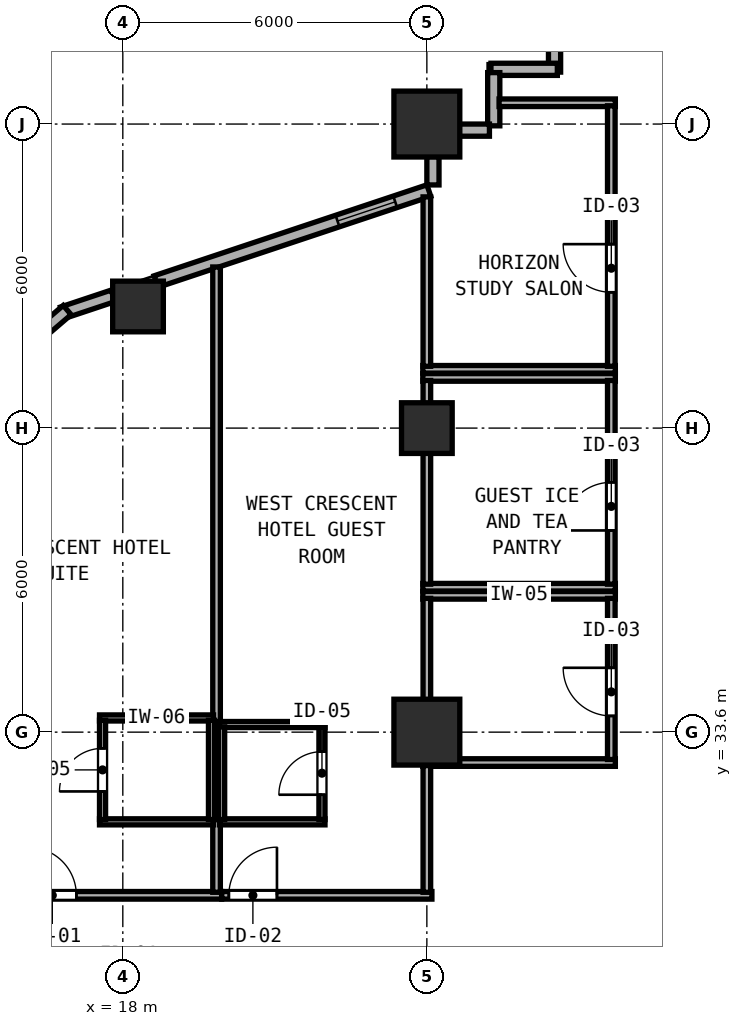
"""IFC4 building model, lengths in metres.
Left out: names, types, materials, properties, quantities, classifications, styles, units other than length and angle.
Written with IfcOpenShell. Run it as: python <this file> out.ifc"""

import sys

from ifc_helpers import new_model, si_unit, direction, frame, frame_2d, origin, origin_2d, place, context, subcontext, project, spatial, rectangle, hollow_rectangle, extrude, element, fill, save


model = new_model("IFC4")
c1 = context("Model", 3, precision=1e-05, world=origin(), true_north=direction((0.0, 1.0)))
c2 = subcontext(c1, "Body", "Model", "MODEL_VIEW")
j1 = project(units=[si_unit("LENGTHUNIT", "METRE"), si_unit("PLANEANGLEUNIT", "RADIAN")], contexts=[c1])
p1 = place(None, origin())
s1 = spatial("IfcSite", under=j1, at=p1, CompositionType="ELEMENT")
p2 = place(p1, origin())
s2 = spatial("IfcBuilding", under=s1, at=p2, CompositionType="ELEMENT")
p3 = place(p2, frame((0.0, 0.0, 35.4)))
s3 = spatial("IfcBuildingStorey", under=s2, at=p3, CompositionType="ELEMENT", Elevation=35.4)
for number, where, z_axis, x_axis in (
    (1, (24.0, 33.6, 0.0), (0.0, 0.0, 1.0), (1.0, 0.0, 0.0)),
    (2, (24.0, 45.6, 0.0), (0.0, 0.0, 1.0), (1.0, 0.0, 0.0)),
):
    element("IfcColumn", number, at=place(p3, frame(where, z_axis=z_axis, x_axis=x_axis)), inside=s3, PredefinedType="COLUMN", context=c2, shape_type="SweptSolid", body=[
        extrude(hollow_rectangle(XDim=1.3, YDim=1.3, WallThickness=0.048, at=origin_2d()), origin(), (0.0, 0.0, 1.0), 3.8),
    ])
for number, where, z_axis, x_axis in (
    (3, (24.0, 39.6, 0.0), (0.0, 0.0, 1.0), (1.0, 0.0, 0.0)),
    (4, (18.3, 42.0, 0.0), (0.0, 0.0, 1.0), (1.0, 0.0, 0.0)),
):
    element("IfcColumn", number, at=place(p3, frame(where, z_axis=z_axis, x_axis=x_axis)), inside=s3, PredefinedType="COLUMN", context=c2, shape_type="SweptSolid", body=[
        extrude(hollow_rectangle(XDim=1.0, YDim=1.0, WallThickness=0.038, at=origin_2d()), origin(), (0.0, 0.0, 1.0), 3.8),
    ])
p4 = place(p3, frame((26.52, 47.995, 0.0), z_axis=(0.0, 0.0, 1.0), x_axis=(0.0, -1.0, 0.0)))
e5 = element("IfcWall", 5, at=p4, inside=s3, PredefinedType="SOLIDWALL", context=c2, shape_type="SweptSolid", body=[
    extrude(rectangle(XDim=1.37, YDim=0.24, at=frame_2d((0.685, 0.0))), origin(), (0.0, 0.0, 1.0), 3.6),
])
p5 = place(p3, frame((26.575, 46.68, 0.0), z_axis=(0.0, 0.0, 1.0), x_axis=(-1.0, 0.0, 0.0)))
e6 = element("IfcWall", 6, at=p5, inside=s3, PredefinedType="SOLIDWALL", context=c2, shape_type="SweptSolid", body=[
    extrude(rectangle(XDim=1.31, YDim=0.24, at=frame_2d((0.655, 0.0))), origin(), (0.0, 0.0, 1.0), 3.6),
])
p6 = place(p3, frame((25.32, 46.615, 0.0), z_axis=(0.0, 0.0, 1.0), x_axis=(0.0, -1.0, 0.0)))
e7 = element("IfcWall", 7, at=p6, inside=s3, PredefinedType="SOLIDWALL", context=c2, shape_type="SweptSolid", body=[
    extrude(rectangle(XDim=1.05, YDim=0.24, at=frame_2d((0.525, 0.0))), origin(), (0.0, 0.0, 1.0), 3.6),
])
p7 = place(p3, frame((25.235, 45.48, 0.0), z_axis=(0.0, 0.0, 1.0), x_axis=(-1.0, 0.0, 0.0)))
e8 = element("IfcWall", 8, at=p7, inside=s3, PredefinedType="SOLIDWALL", context=c2, shape_type="SweptSolid", body=[
    extrude(rectangle(XDim=0.593, YDim=0.24, at=frame_2d((0.296, 0.0))), origin(), (0.0, 0.0, 1.0), 3.6),
])
p8 = place(p3, frame((24.12, 44.958, 0.0), z_axis=(0.0, 0.0, 1.0), x_axis=(0.0, -1.0, 0.0)))
e9 = element("IfcWall", 9, at=p8, inside=s3, PredefinedType="SOLIDWALL", context=c2, shape_type="SweptSolid", body=[
    extrude(rectangle(XDim=0.56, YDim=0.24, at=frame_2d((0.28, 0.0))), origin(), (0.0, 0.0, 1.0), 3.097),
])
p9 = place(p3, frame((24.039, 44.287, 0.0), z_axis=(0.0, 0.0, 1.0), x_axis=(-0.948678995954, -0.316240672014, 0.0)))
e10 = element("IfcWall", 10, at=p9, inside=s3, PredefinedType="SOLIDWALL", context=c2, shape_type="SweptSolid", body=[
    extrude(rectangle(XDim=5.675, YDim=0.24, at=frame_2d((2.837, 0.0))), origin(), (0.0, 0.0, 1.0), 3.097),
])
p10 = place(p9, frame((0.7, 0.0, 0.85)))
e11 = element("IfcOpeningElement", 11, at=p10, cuts=e10, PredefinedType="OPENING", context=c2, shape_type="SweptSolid", body=[
    extrude(rectangle(XDim=1.2, YDim=1.85, at=frame_2d((0.6, 0.925))), frame((0.0, 0.13, 0.0), z_axis=(0.0, -1.0, 0.0), x_axis=(1.0, 0.0, 0.0)), (0.0, 0.0, 1.0), 0.26),
])
p11 = place(p3, frame((17.808, 42.209, 0.0), z_axis=(0.0, 0.0, 1.0), x_axis=(-0.948706457285, -0.316158279832, 0.0)))
e12 = element("IfcWall", 12, at=p11, inside=s3, PredefinedType="SOLIDWALL", context=c2, shape_type="SweptSolid", body=[
    extrude(rectangle(XDim=1.054, YDim=0.24, at=frame_2d((0.527, 0.0))), origin(), (0.0, 0.0, 1.0), 3.6),
])
p12 = place(p3, frame((16.902, 41.929, 0.0), z_axis=(0.0, 0.0, 1.0), x_axis=(-0.759275136126, -0.650769750112, 0.0)))
e13 = element("IfcWall", 13, at=p12, inside=s3, PredefinedType="SOLIDWALL", context=c2, shape_type="SweptSolid", body=[
    extrude(rectangle(XDim=3.719, YDim=0.24, at=frame_2d((1.86, 0.0))), origin(), (0.0, 0.0, 1.0), 3.6),
])
p13 = place(p12, frame((0.7, 0.0, 0.85)))
e14 = element("IfcOpeningElement", 14, at=p13, cuts=e13, PredefinedType="OPENING", context=c2, shape_type="SweptSolid", body=[
    extrude(rectangle(XDim=1.2, YDim=1.85, at=frame_2d((0.6, 0.925))), frame((0.0, 0.13, 0.0), z_axis=(0.0, -1.0, 0.0), x_axis=(1.0, 0.0, 0.0)), (0.0, 0.0, 1.0), 0.26),
])
for number, where, z_axis, x_axis in (
    (15, (23.92, 36.3, 0.0), (0.0, 0.0, 1.0), (1.0, 0.0, 0.0)),
    (16, (23.92, 33.0, 0.0), (0.0, 0.0, 1.0), (1.0, 0.0, 0.0)),
):
    element("IfcWall", number, at=place(p3, frame(where, z_axis=z_axis, x_axis=x_axis)), inside=s3, PredefinedType="PARTITIONING", context=c2, shape_type="SweptSolid", body=[
        extrude(rectangle(XDim=3.8, YDim=0.15, at=frame_2d((1.9, 0.0))), origin(), (0.0, 0.0, 1.0), 3.6),
    ])
p14 = place(p3, frame((24.0, 33.06, 0.0), z_axis=(0.0, 0.0, 1.0), x_axis=(0.0, 1.0, 0.0)))
e17 = element("IfcWall", 17, at=p14, inside=s3, PredefinedType="PARTITIONING", context=c2, shape_type="SweptSolid", body=[
    extrude(rectangle(XDim=3.18, YDim=0.15, at=frame_2d((1.59, 0.0))), origin(), (0.0, 0.0, 1.0), 3.097),
])
p15 = place(p3, frame((27.64, 33.06, 0.0), z_axis=(0.0, 0.0, 1.0), x_axis=(0.0, 1.0, 0.0)))
e18 = element("IfcWall", 18, at=p15, inside=s3, PredefinedType="PARTITIONING", context=c2, shape_type="SweptSolid", body=[
    extrude(rectangle(XDim=3.18, YDim=0.15, at=frame_2d((1.59, 0.0))), origin(), (0.0, 0.0, 1.0), 3.6),
])
p16 = place(p15, frame((1.81, 0.0, 0.0), z_axis=(0.0, 0.0, 1.0), x_axis=(-1.0, 0.0, 0.0)))
e19 = element("IfcOpeningElement", 19, at=p16, cuts=e18, PredefinedType="OPENING", context=c2, shape_type="SweptSolid", body=[
    extrude(rectangle(XDim=0.95, YDim=2.12, at=frame_2d((0.475, 1.06))), frame((0.0, 0.085, 0.0), z_axis=(0.0, -1.0, 0.0), x_axis=(1.0, 0.0, 0.0)), (0.0, 0.0, 1.0), 0.17),
])
for number, where, z_axis, x_axis in (
    (20, (23.92, 40.6, 0.0), (0.0, 0.0, 1.0), (1.0, 0.0, 0.0)),
    (21, (23.92, 36.46, 0.0), (0.0, 0.0, 1.0), (1.0, 0.0, 0.0)),
):
    element("IfcWall", number, at=place(p3, frame(where, z_axis=z_axis, x_axis=x_axis)), inside=s3, PredefinedType="PARTITIONING", context=c2, shape_type="SweptSolid", body=[
        extrude(rectangle(XDim=3.8, YDim=0.15, at=frame_2d((1.9, 0.0))), origin(), (0.0, 0.0, 1.0), 3.6),
    ])
p17 = place(p3, frame((24.0, 36.52, 0.0), z_axis=(0.0, 0.0, 1.0), x_axis=(0.0, 1.0, 0.0)))
e22 = element("IfcWall", 22, at=p17, inside=s3, PredefinedType="PARTITIONING", context=c2, shape_type="SweptSolid", body=[
    extrude(rectangle(XDim=4.02, YDim=0.15, at=frame_2d((2.01, 0.0))), origin(), (0.0, 0.0, 1.0), 3.097),
])
p18 = place(p3, frame((27.64, 36.52, 0.0), z_axis=(0.0, 0.0, 1.0), x_axis=(0.0, 1.0, 0.0)))
e23 = element("IfcWall", 23, at=p18, inside=s3, PredefinedType="PARTITIONING", context=c2, shape_type="SweptSolid", body=[
    extrude(rectangle(XDim=4.02, YDim=0.15, at=frame_2d((2.01, 0.0))), origin(), (0.0, 0.0, 1.0), 3.6),
])
p19 = place(p18, frame((2.01, 0.0, 0.0), z_axis=(0.0, 0.0, 1.0), x_axis=(-1.0, 0.0, 0.0)))
e24 = element("IfcOpeningElement", 24, at=p19, cuts=e23, PredefinedType="OPENING", context=c2, shape_type="SweptSolid", body=[
    extrude(rectangle(XDim=0.95, YDim=2.12, at=frame_2d((0.475, 1.06))), frame((0.0, 0.085, 0.0), z_axis=(0.0, -1.0, 0.0), x_axis=(1.0, 0.0, 0.0)), (0.0, 0.0, 1.0), 0.17),
])
p20 = place(p3, frame((25.425, 46.02, 0.0), z_axis=(0.0, 0.0, 1.0), x_axis=(1.0, 0.0, 0.0)))
e25 = element("IfcWall", 25, at=p20, inside=s3, PredefinedType="PARTITIONING", context=c2, shape_type="SweptSolid", body=[
    extrude(rectangle(XDim=2.295, YDim=0.15, at=frame_2d((1.147, 0.0))), origin(), (0.0, 0.0, 1.0), 3.6),
])
p21 = place(p3, frame((23.92, 40.76, 0.0), z_axis=(0.0, 0.0, 1.0), x_axis=(1.0, 0.0, 0.0)))
e26 = element("IfcWall", 26, at=p21, inside=s3, PredefinedType="PARTITIONING", context=c2, shape_type="SweptSolid", body=[
    extrude(rectangle(XDim=3.8, YDim=0.15, at=frame_2d((1.9, 0.0))), origin(), (0.0, 0.0, 1.0), 3.6),
])
p22 = place(p3, frame((24.0, 40.82, 0.0), z_axis=(0.0, 0.0, 1.0), x_axis=(0.0, 1.0, 0.0)))
e27 = element("IfcWall", 27, at=p22, inside=s3, PredefinedType="PARTITIONING", context=c2, shape_type="SweptSolid", body=[
    extrude(rectangle(XDim=3.343, YDim=0.15, at=frame_2d((1.671, 0.0))), origin(), (0.0, 0.0, 1.0), 3.097),
])
p23 = place(p3, frame((27.64, 40.82, 0.0), z_axis=(0.0, 0.0, 1.0), x_axis=(0.0, 1.0, 0.0)))
e28 = element("IfcWall", 28, at=p23, inside=s3, PredefinedType="PARTITIONING", context=c2, shape_type="SweptSolid", body=[
    extrude(rectangle(XDim=5.14, YDim=0.15, at=frame_2d((2.57, 0.0))), origin(), (0.0, 0.0, 1.0), 3.6),
])
p24 = place(p23, frame((2.41, 0.0, 0.0), z_axis=(0.0, 0.0, 1.0), x_axis=(-1.0, 0.0, 0.0)))
e29 = element("IfcOpeningElement", 29, at=p24, cuts=e28, PredefinedType="OPENING", context=c2, shape_type="SweptSolid", body=[
    extrude(rectangle(XDim=0.95, YDim=2.12, at=frame_2d((0.475, 1.06))), frame((0.0, 0.085, 0.0), z_axis=(0.0, -1.0, 0.0), x_axis=(1.0, 0.0, 0.0)), (0.0, 0.0, 1.0), 0.17),
])
p25 = place(p3, frame((11.7, 30.38, 0.0), z_axis=(0.0, 0.0, 1.0), x_axis=(1.0, 0.0, 0.0)))
e30 = element("IfcWall", 30, at=p25, inside=s3, PredefinedType="PARTITIONING", context=c2, shape_type="SweptSolid", body=[
    extrude(rectangle(XDim=8.25, YDim=0.15, at=frame_2d((4.125, 0.0))), origin(), (0.0, 0.0, 1.0), 3.6),
])
p26 = place(p25, frame((4.434, 0.0, 0.0)))
e31 = element("IfcOpeningElement", 31, at=p26, cuts=e30, PredefinedType="OPENING", context=c2, shape_type="SweptSolid", body=[
    extrude(rectangle(XDim=0.95, YDim=2.18, at=frame_2d((0.475, 1.09))), frame((0.0, 0.085, 0.0), z_axis=(0.0, -1.0, 0.0), x_axis=(1.0, 0.0, 0.0)), (0.0, 0.0, 1.0), 0.17),
])
p27 = place(p3, frame((19.85, 30.44, 0.0), z_axis=(0.0, 0.0, 1.0), x_axis=(0.0, 1.0, 0.0)))
e32 = element("IfcWall", 32, at=p27, inside=s3, PredefinedType="PARTITIONING", context=c2, shape_type="SweptSolid", body=[
    extrude(rectangle(XDim=12.34, YDim=0.15, at=frame_2d((6.17, 0.0))), origin(), (0.0, 0.0, 1.0), 3.6),
])
for number, where, z_axis, x_axis in (
    (33, (17.54, 33.88, 0.0), (0.0, 0.0, 1.0), (1.0, 0.0, 0.0)),
    (34, (17.54, 31.83, 0.0), (0.0, 0.0, 1.0), (1.0, 0.0, 0.0)),
):
    element("IfcWall", number, at=place(p3, frame(where, z_axis=z_axis, x_axis=x_axis)), inside=s3, PredefinedType="PARTITIONING", context=c2, shape_type="SweptSolid", body=[
        extrude(rectangle(XDim=2.25, YDim=0.12, at=frame_2d((1.125, 0.0))), origin(), (0.0, 0.0, 1.0), 3.6),
    ])
p28 = place(p3, frame((17.6, 31.875, 0.0), z_axis=(0.0, 0.0, 1.0), x_axis=(0.0, 1.0, 0.0)))
e35 = element("IfcWall", 35, at=p28, inside=s3, PredefinedType="PARTITIONING", context=c2, shape_type="SweptSolid", body=[
    extrude(rectangle(XDim=1.96, YDim=0.12, at=frame_2d((0.98, 0.0))), origin(), (0.0, 0.0, 1.0), 3.6),
])
p29 = place(p28, frame((1.405, 0.0, 0.0), z_axis=(0.0, 0.0, 1.0), x_axis=(-1.0, 0.0, 0.0)))
e36 = element("IfcOpeningElement", 36, at=p29, cuts=e35, PredefinedType="OPENING", context=c2, shape_type="SweptSolid", body=[
    extrude(rectangle(XDim=0.85, YDim=2.1, at=frame_2d((0.425, 1.05))), frame((0.0, 0.07, 0.0), z_axis=(0.0, -1.0, 0.0), x_axis=(1.0, 0.0, 0.0)), (0.0, 0.0, 1.0), 0.14),
])
p30 = place(p3, frame((19.75, 31.875, 0.0), z_axis=(0.0, 0.0, 1.0), x_axis=(0.0, 1.0, 0.0)))
e37 = element("IfcWall", 37, at=p30, inside=s3, PredefinedType="PARTITIONING", context=c2, shape_type="SweptSolid", body=[
    extrude(rectangle(XDim=1.96, YDim=0.12, at=frame_2d((0.98, 0.0))), origin(), (0.0, 0.0, 1.0), 3.6),
])
p31 = place(p3, frame((19.952, 30.38, 0.0), z_axis=(0.0, 0.0, 1.0), x_axis=(1.0, 0.0, 0.0)))
e38 = element("IfcWall", 38, at=p31, inside=s3, PredefinedType="PARTITIONING", context=c2, shape_type="SweptSolid", body=[
    extrude(rectangle(XDim=4.148, YDim=0.15, at=frame_2d((2.074, 0.0))), origin(), (0.0, 0.0, 1.0), 3.6),
])
p32 = place(p31, frame((0.14, 0.0, 0.0)))
e39 = element("IfcOpeningElement", 39, at=p32, cuts=e38, PredefinedType="OPENING", context=c2, shape_type="SweptSolid", body=[
    extrude(rectangle(XDim=0.95, YDim=2.15, at=frame_2d((0.475, 1.075))), frame((0.0, 0.085, 0.0), z_axis=(0.0, -1.0, 0.0), x_axis=(1.0, 0.0, 0.0)), (0.0, 0.0, 1.0), 0.17),
])
p33 = place(p3, frame((24.0, 30.44, 0.0), z_axis=(0.0, 0.0, 1.0), x_axis=(0.0, 1.0, 0.0)))
e40 = element("IfcWall", 40, at=p33, inside=s3, PredefinedType="PARTITIONING", context=c2, shape_type="SweptSolid", body=[
    extrude(rectangle(XDim=2.5, YDim=0.15, at=frame_2d((1.25, 0.0))), origin(), (0.0, 0.0, 1.0), 3.097),
])
for number, where, z_axis, x_axis in (
    (41, (19.91, 33.75, 0.0), (0.0, 0.0, 1.0), (1.0, 0.0, 0.0)),
    (42, (19.91, 31.83, 0.0), (0.0, 0.0, 1.0), (1.0, 0.0, 0.0)),
):
    element("IfcWall", number, at=place(p3, frame(where, z_axis=z_axis, x_axis=x_axis)), inside=s3, PredefinedType="PARTITIONING", context=c2, shape_type="SweptSolid", body=[
        extrude(rectangle(XDim=2.08, YDim=0.12, at=frame_2d((1.04, 0.0))), origin(), (0.0, 0.0, 1.0), 3.6),
    ])
p34 = place(p3, frame((19.95, 31.875, 0.0), z_axis=(0.0, 0.0, 1.0), x_axis=(0.0, 1.0, 0.0)))
e43 = element("IfcWall", 43, at=p34, inside=s3, PredefinedType="PARTITIONING", context=c2, shape_type="SweptSolid", body=[
    extrude(rectangle(XDim=1.83, YDim=0.12, at=frame_2d((0.915, 0.0))), origin(), (0.0, 0.0, 1.0), 3.6),
])
p35 = place(p3, frame((21.93, 31.875, 0.0), z_axis=(0.0, 0.0, 1.0), x_axis=(0.0, 1.0, 0.0)))
e44 = element("IfcWall", 44, at=p35, inside=s3, PredefinedType="PARTITIONING", context=c2, shape_type="SweptSolid", body=[
    extrude(rectangle(XDim=1.83, YDim=0.12, at=frame_2d((0.915, 0.0))), origin(), (0.0, 0.0, 1.0), 3.6),
])
p36 = place(p35, frame((0.49, 0.0, 0.0)))
e45 = element("IfcOpeningElement", 45, at=p36, cuts=e44, PredefinedType="OPENING", context=c2, shape_type="SweptSolid", body=[
    extrude(rectangle(XDim=0.85, YDim=2.1, at=frame_2d((0.425, 1.05))), frame((0.0, 0.07, 0.0), z_axis=(0.0, -1.0, 0.0), x_axis=(1.0, 0.0, 0.0)), (0.0, 0.0, 1.0), 0.14),
])
p37 = place(p10, origin())
e46 = element("IfcWindow", 46, at=p37, inside=s3, PartitioningType="SINGLE_PANEL", PredefinedType="WINDOW", context=c2, shape_type="SweptSolid", body=[
    extrude(rectangle(XDim=1.2, YDim=1.85, at=frame_2d((0.6, 0.925))), frame((0.0, 0.03, 0.0), z_axis=(0.0, -1.0, 0.0), x_axis=(1.0, 0.0, 0.0)), (0.0, 0.0, 1.0), 0.06),
])
fill(e11, e46)
p38 = place(p16, origin())
e47 = element("IfcDoor", 47, at=p38, inside=s3, OperationType="SINGLE_SWING_LEFT", PredefinedType="DOOR", context=c2, shape_type="SweptSolid", body=[
    extrude(rectangle(XDim=0.95, YDim=2.12, at=frame_2d((0.475, 1.06))), frame((0.0, 0.025, 0.0), z_axis=(0.0, -1.0, 0.0), x_axis=(1.0, 0.0, 0.0)), (0.0, 0.0, 1.0), 0.05),
])
fill(e19, e47)
p39 = place(p19, origin())
e48 = element("IfcDoor", 48, at=p39, inside=s3, OperationType="SINGLE_SWING_RIGHT", PredefinedType="DOOR", context=c2, shape_type="SweptSolid", body=[
    extrude(rectangle(XDim=0.95, YDim=2.12, at=frame_2d((0.475, 1.06))), frame((0.0, 0.025, 0.0), z_axis=(0.0, -1.0, 0.0), x_axis=(1.0, 0.0, 0.0)), (0.0, 0.0, 1.0), 0.05),
])
fill(e24, e48)
p40 = place(p24, origin())
e49 = element("IfcDoor", 49, at=p40, inside=s3, OperationType="SINGLE_SWING_LEFT", PredefinedType="DOOR", context=c2, shape_type="SweptSolid", body=[
    extrude(rectangle(XDim=0.95, YDim=2.12, at=frame_2d((0.475, 1.06))), frame((0.0, 0.025, 0.0), z_axis=(0.0, -1.0, 0.0), x_axis=(1.0, 0.0, 0.0)), (0.0, 0.0, 1.0), 0.05),
])
fill(e29, e49)
p41 = place(p26, origin())
e50 = element("IfcDoor", 50, at=p41, inside=s3, OperationType="SINGLE_SWING_LEFT", PredefinedType="DOOR", context=c2, shape_type="SweptSolid", body=[
    extrude(rectangle(XDim=0.95, YDim=2.18, at=frame_2d((0.475, 1.09))), frame((0.0, 0.025, 0.0), z_axis=(0.0, -1.0, 0.0), x_axis=(1.0, 0.0, 0.0)), (0.0, 0.0, 1.0), 0.05),
])
fill(e31, e50)
p42 = place(p29, origin())
e51 = element("IfcDoor", 51, at=p42, inside=s3, OperationType="SINGLE_SWING_RIGHT", PredefinedType="DOOR", context=c2, shape_type="SweptSolid", body=[
    extrude(rectangle(XDim=0.85, YDim=2.1, at=frame_2d((0.425, 1.05))), frame((0.0, 0.025, 0.0), z_axis=(0.0, -1.0, 0.0), x_axis=(1.0, 0.0, 0.0)), (0.0, 0.0, 1.0), 0.05),
])
fill(e36, e51)
p43 = place(p32, origin())
e52 = element("IfcDoor", 52, at=p43, inside=s3, OperationType="SINGLE_SWING_RIGHT", PredefinedType="DOOR", context=c2, shape_type="SweptSolid", body=[
    extrude(rectangle(XDim=0.95, YDim=2.15, at=frame_2d((0.475, 1.075))), frame((0.0, 0.025, 0.0), z_axis=(0.0, -1.0, 0.0), x_axis=(1.0, 0.0, 0.0)), (0.0, 0.0, 1.0), 0.05),
])
fill(e39, e52)
p44 = place(p36, origin())
e53 = element("IfcDoor", 53, at=p44, inside=s3, OperationType="SINGLE_SWING_LEFT", PredefinedType="DOOR", context=c2, shape_type="SweptSolid", body=[
    extrude(rectangle(XDim=0.85, YDim=2.1, at=frame_2d((0.425, 1.05))), frame((0.0, 0.025, 0.0), z_axis=(0.0, -1.0, 0.0), x_axis=(1.0, 0.0, 0.0)), (0.0, 0.0, 1.0), 0.05),
])
fill(e45, e53)
save(model, sys.argv[1])
